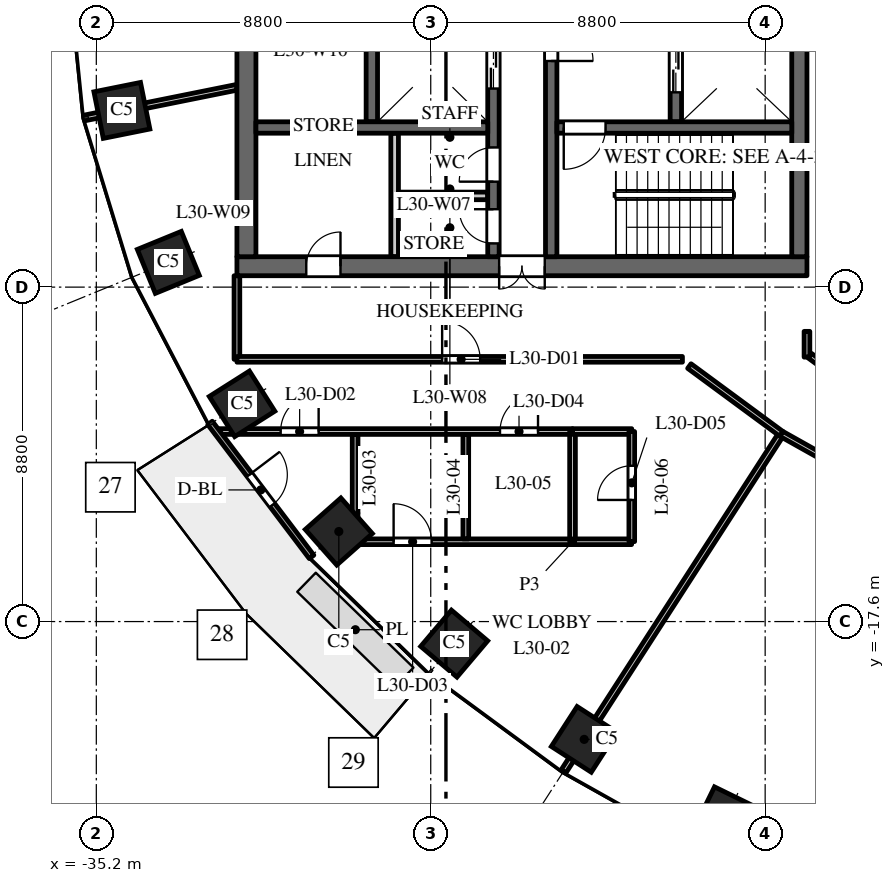
"""IFC4 building model, lengths in metres.
Left out: names, types, materials, properties, quantities, classifications, styles, units other than length and angle.
Written with IfcOpenShell. Run it as: python <this file> out.ifc"""

import sys

from ifc_helpers import new_model, si_unit, direction, frame, frame_2d, origin, origin_2d, place, context, subcontext, project, spatial, rectangle, extrude, element, fill, save


model = new_model("IFC4")
c1 = context("Model", 3, precision=1e-05, world=origin(), true_north=direction((0.0, 1.0)))
c2 = subcontext(c1, "Body", "Model", "MODEL_VIEW")
j1 = project(units=[si_unit("LENGTHUNIT", "METRE"), si_unit("PLANEANGLEUNIT", "RADIAN")], contexts=[c1])
p1 = place(None, origin())
s1 = spatial("IfcSite", under=j1, at=p1, CompositionType="ELEMENT")
p2 = place(p1, origin())
s2 = spatial("IfcBuilding", under=s1, at=p2, CompositionType="ELEMENT")
p3 = place(p2, frame((0.0, 0.0, 132.0)))
s3 = spatial("IfcBuildingStorey", under=s2, at=p3, CompositionType="ELEMENT", Elevation=132.0)
for number, where, z_axis, x_axis in (
    (1, (-34.527, -4.151, 0.0), (0.0, 0.0, 1.0), (0.197, -0.98, 0.0)),
    (2, (-33.305, -8.149, 0.0), (0.0, 0.0, 1.0), (0.379, -0.925, 0.0)),
    (3, (-31.365, -11.871, 0.0), (0.0, 0.0, 1.0), (0.535, -0.845, 0.0)),
    (4, (-28.819, -15.23, 0.0), (0.0, 0.0, 1.0), (0.663, -0.749, 0.0)),
    (5, (-25.783, -18.18, 0.0), (0.0, 0.0, 1.0), (0.763, -0.646, 0.0)),
    (6, (-22.362, -20.7, 0.0), (0.0, 0.0, 1.0), (0.84, -0.542, 0.0)),
    (7, (-18.646, -22.785, 0.0), (0.0, 0.0, 1.0), (0.898, -0.439, 0.0)),
):
    element("IfcColumn", number, at=place(p3, frame(where, z_axis=z_axis, x_axis=x_axis)), inside=s3, PredefinedType="COLUMN", context=c2, shape_type="SweptSolid", body=[
        extrude(rectangle(XDim=1.25, YDim=1.25, at=origin_2d()), origin(), (0.0, 0.0, 1.0), 4.0),
    ])
p4 = place(p3, frame((-16.5, -8.25, 0.0), z_axis=(0.0, 0.0, 1.0), x_axis=(-1.0, 0.0, 0.0)))
e8 = element("IfcWall", 8, at=p4, inside=s3, PredefinedType="SHEAR", context=c2, shape_type="SweptSolid", body=[
    extrude(rectangle(XDim=15.0, YDim=0.5, at=frame_2d((7.5, 0.0))), origin(), (0.0, 0.0, 1.0), 3.7),
])
p5 = place(p4, frame((6.9, 0.0, 0.0)))
e9 = element("IfcOpeningElement", 9, at=p5, cuts=e8, PredefinedType="OPENING", context=c2, shape_type="SweptSolid", body=[
    extrude(rectangle(XDim=1.2, YDim=2.1, at=frame_2d((0.6, 1.05))), frame((0.0, 0.26, 0.0), z_axis=(0.0, -1.0, 0.0), x_axis=(1.0, 0.0, 0.0)), (0.0, 0.0, 1.0), 0.52),
])
p6 = place(p4, frame((12.275, 0.0, 0.0)))
e10 = element("IfcOpeningElement", 10, at=p6, cuts=e8, PredefinedType="OPENING", context=c2, shape_type="SweptSolid", body=[
    extrude(rectangle(XDim=0.9, YDim=2.1, at=frame_2d((0.45, 1.05))), frame((0.0, 0.26, 0.0), z_axis=(0.0, -1.0, 0.0), x_axis=(1.0, 0.0, 0.0)), (0.0, 0.0, 1.0), 0.52),
])
p7 = place(p3, frame((-27.95, -4.45, 0.0), z_axis=(0.0, 0.0, 1.0), x_axis=(0.0, 1.0, 0.0)))
e11 = element("IfcWall", 11, at=p7, inside=s3, PredefinedType="SHEAR", context=c2, shape_type="SweptSolid", body=[
    extrude(rectangle(XDim=8.9, YDim=0.3, at=frame_2d((4.45, 0.0))), origin(), (0.0, 0.0, 1.0), 3.7),
])
p8 = place(p3, frame((-19.95, -4.45, 0.0), z_axis=(0.0, 0.0, 1.0), x_axis=(0.0, 1.0, 0.0)))
e12 = element("IfcWall", 12, at=p8, inside=s3, PredefinedType="SHEAR", context=c2, shape_type="SweptSolid", body=[
    extrude(rectangle(XDim=8.9, YDim=0.3, at=frame_2d((4.45, 0.0))), origin(), (0.0, 0.0, 1.0), 3.7),
])
p9 = place(p8, frame((0.775, 0.0, 0.0)))
e13 = element("IfcOpeningElement", 13, at=p9, cuts=e12, PredefinedType="OPENING", context=c2, shape_type="SweptSolid", body=[
    extrude(rectangle(XDim=1.2, YDim=2.1, at=frame_2d((0.6, 1.05))), frame((0.0, 0.16, 0.0), z_axis=(0.0, -1.0, 0.0), x_axis=(1.0, 0.0, 0.0)), (0.0, 0.0, 1.0), 0.32),
])
p10 = place(p8, frame((7.35, 0.0, 0.0)))
e14 = element("IfcOpeningElement", 14, at=p10, cuts=e12, PredefinedType="OPENING", context=c2, shape_type="SweptSolid", body=[
    extrude(rectangle(XDim=0.9, YDim=2.1, at=frame_2d((0.45, 1.05))), frame((0.0, 0.16, 0.0), z_axis=(0.0, -1.0, 0.0), x_axis=(1.0, 0.0, 0.0)), (0.0, 0.0, 1.0), 0.32),
])
p11 = place(p3, frame((-24.75, -8.0, 0.0), z_axis=(0.0, 0.0, 1.0), x_axis=(0.0, 1.0, 0.0)))
e15 = element("IfcWall", 15, at=p11, inside=s3, PredefinedType="SHEAR", context=c2, shape_type="SweptSolid", body=[
    extrude(rectangle(XDim=16.0, YDim=0.3, at=frame_2d((8.0, 0.0))), origin(), (0.0, 0.0, 1.0), 3.7),
])
p12 = place(p11, frame((4.425, 0.0, 0.0)))
e16 = element("IfcOpeningElement", 16, at=p12, cuts=e15, PredefinedType="OPENING", context=c2, shape_type="SweptSolid", body=[
    extrude(rectangle(XDim=1.1, YDim=2.1, at=frame_2d((0.55, 1.05))), frame((0.0, 0.16, 0.0), z_axis=(0.0, -1.0, 0.0), x_axis=(1.0, 0.0, 0.0)), (0.0, 0.0, 1.0), 0.32),
])
p13 = place(p11, frame((7.45, 0.0, 0.0)))
e17 = element("IfcOpeningElement", 17, at=p13, cuts=e15, PredefinedType="OPENING", context=c2, shape_type="SweptSolid", body=[
    extrude(rectangle(XDim=1.1, YDim=2.1, at=frame_2d((0.55, 1.05))), frame((0.0, 0.16, 0.0), z_axis=(0.0, -1.0, 0.0), x_axis=(1.0, 0.0, 0.0)), (0.0, 0.0, 1.0), 0.32),
])
p14 = place(p11, frame((10.425, 0.0, 0.0)))
e18 = element("IfcOpeningElement", 18, at=p14, cuts=e15, PredefinedType="OPENING", context=c2, shape_type="SweptSolid", body=[
    extrude(rectangle(XDim=1.2, YDim=2.1, at=frame_2d((0.6, 1.05))), frame((0.0, 0.16, 0.0), z_axis=(0.0, -1.0, 0.0), x_axis=(1.0, 0.0, 0.0)), (0.0, 0.0, 1.0), 0.32),
])
p15 = place(p11, frame((13.75, 0.0, 0.0)))
e19 = element("IfcOpeningElement", 19, at=p15, cuts=e15, PredefinedType="OPENING", context=c2, shape_type="SweptSolid", body=[
    extrude(rectangle(XDim=0.9, YDim=2.1, at=frame_2d((0.45, 1.05))), frame((0.0, 0.16, 0.0), z_axis=(0.0, -1.0, 0.0), x_axis=(1.0, 0.0, 0.0)), (0.0, 0.0, 1.0), 0.32),
])
p16 = place(p11, frame((1.975, 0.0, 0.0)))
e20 = element("IfcOpeningElement", 20, at=p16, cuts=e15, PredefinedType="OPENING", context=c2, shape_type="SweptSolid", body=[
    extrude(rectangle(XDim=0.9, YDim=2.1, at=frame_2d((0.45, 1.05))), frame((0.0, 0.16, 0.0), z_axis=(0.0, -1.0, 0.0), x_axis=(1.0, 0.0, 0.0)), (0.0, 0.0, 1.0), 0.32),
])
p17 = place(p11, frame((0.35, 0.0, 0.0)))
e21 = element("IfcOpeningElement", 21, at=p17, cuts=e15, PredefinedType="OPENING", context=c2, shape_type="SweptSolid", body=[
    extrude(rectangle(XDim=0.9, YDim=2.1, at=frame_2d((0.45, 1.05))), frame((0.0, 0.16, 0.0), z_axis=(0.0, -1.0, 0.0), x_axis=(1.0, 0.0, 0.0)), (0.0, 0.0, 1.0), 0.32),
])
p18 = place(p3, frame((-16.7, -8.0, 0.0), z_axis=(0.0, 0.0, 1.0), x_axis=(0.0, 1.0, 0.0)))
e22 = element("IfcWall", 22, at=p18, inside=s3, PredefinedType="SHEAR", context=c2, shape_type="SweptSolid", body=[
    extrude(rectangle(XDim=16.0, YDim=0.4, at=frame_2d((8.0, 0.0))), origin(), (0.0, 0.0, 1.0), 3.7),
])
p19 = place(p3, frame((-31.25, -8.0, 0.0), z_axis=(0.0, 0.0, 1.0), x_axis=(0.0, 1.0, 0.0)))
e23 = element("IfcWall", 23, at=p19, inside=s3, PredefinedType="SHEAR", context=c2, shape_type="SweptSolid", body=[
    extrude(rectangle(XDim=16.0, YDim=0.5, at=frame_2d((8.0, 0.0))), origin(), (0.0, 0.0, 1.0), 3.7),
])
p20 = place(p3, frame((-27.35, -8.0, 0.0), z_axis=(0.0, 0.0, 1.0), x_axis=(0.0, 1.0, 0.0)))
e24 = element("IfcWall", 24, at=p20, inside=s3, PredefinedType="PARTITIONING", context=c2, shape_type="SweptSolid", body=[
    extrude(rectangle(XDim=3.25, YDim=0.2, at=frame_2d((1.625, 0.0))), origin(), (0.0, 0.0, 1.0), 3.7),
])
p21 = place(p3, frame((-24.9, -6.4, 0.0), z_axis=(0.0, 0.0, 1.0), x_axis=(-1.0, 0.0, 0.0)))
e25 = element("IfcWall", 25, at=p21, inside=s3, PredefinedType="PARTITIONING", context=c2, shape_type="SweptSolid", body=[
    extrude(rectangle(XDim=2.35, YDim=0.2, at=frame_2d((1.175, 0.0))), origin(), (0.0, 0.0, 1.0), 3.7),
])
p22 = place(p3, frame((-24.9, -4.6, 0.0), z_axis=(0.0, 0.0, 1.0), x_axis=(-1.0, 0.0, 0.0)))
e26 = element("IfcWall", 26, at=p22, inside=s3, PredefinedType="SHEAR", context=c2, shape_type="SweptSolid", body=[
    extrude(rectangle(XDim=6.1, YDim=0.3, at=frame_2d((3.05, 0.0))), origin(), (0.0, 0.0, 1.0), 3.7),
])
p23 = place(p3, frame((-23.23, -8.0, 0.0), z_axis=(0.0, 0.0, 1.0), x_axis=(0.0, 1.0, 0.0)))
e27 = element("IfcWall", 27, at=p23, inside=s3, PredefinedType="SHEAR", context=c2, shape_type="SweptSolid", body=[
    extrude(rectangle(XDim=7.875, YDim=0.3, at=frame_2d((3.938, 0.0))), origin(), (0.0, 0.0, 1.0), 3.7),
])
p24 = place(p23, frame((5.15, 0.0, 0.0)))
e28 = element("IfcOpeningElement", 28, at=p24, cuts=e27, PredefinedType="OPENING", context=c2, shape_type="SweptSolid", body=[
    extrude(rectangle(XDim=1.1, YDim=2.1, at=frame_2d((0.55, 1.05))), frame((0.0, 0.16, 0.0), z_axis=(0.0, -1.0, 0.0), x_axis=(1.0, 0.0, 0.0)), (0.0, 0.0, 1.0), 0.32),
])
p25 = place(p3, frame((-16.9, -4.6, 0.0), z_axis=(0.0, 0.0, 1.0), x_axis=(-1.0, 0.0, 0.0)))
e29 = element("IfcWall", 29, at=p25, inside=s3, PredefinedType="SHEAR", context=c2, shape_type="SweptSolid", body=[
    extrude(rectangle(XDim=6.18, YDim=0.3, at=frame_2d((3.09, 0.0))), origin(), (0.0, 0.0, 1.0), 3.7),
])
p26 = place(p25, frame((4.9, 0.0, 0.0)))
e30 = element("IfcOpeningElement", 30, at=p26, cuts=e29, PredefinedType="OPENING", context=c2, shape_type="SweptSolid", body=[
    extrude(rectangle(XDim=1.1, YDim=2.1, at=frame_2d((0.55, 1.05))), frame((0.0, 0.16, 0.0), z_axis=(0.0, -1.0, 0.0), x_axis=(1.0, 0.0, 0.0)), (0.0, 0.0, 1.0), 0.32),
])
p27 = place(p3, frame((-32.208, -12.374, 0.0), z_axis=(0.0, 0.0, 1.0), x_axis=(0.604045763106, -0.796949632081, 0.0)))
e31 = element("IfcWall", 31, at=p27, inside=s3, PredefinedType="STANDARD", context=c2, shape_type="SweptSolid", body=[
    extrude(rectangle(XDim=4.423, YDim=0.15, at=frame_2d((2.212, 0.0))), origin(), (0.0, 0.0, 1.0), 3.7),
])
p28 = place(p27, frame((1.712, 0.0, 0.0)))
e32 = element("IfcOpeningElement", 32, at=p28, cuts=e31, PredefinedType="OPENING", context=c2, shape_type="SweptSolid", body=[
    extrude(rectangle(XDim=1.0, YDim=2.4, at=frame_2d((0.5, 1.2))), frame((0.0, 0.085, 0.0), z_axis=(0.0, -1.0, 0.0), x_axis=(1.0, 0.0, 0.0)), (0.0, 0.0, 1.0), 0.17),
])
p29 = place(p3, frame((-35.512, -4.349, 0.0), z_axis=(0.0, 0.0, 1.0), x_axis=(0.980357474535, 0.197228857227, 0.0)))
e33 = element("IfcWall", 33, at=p29, inside=s3, PredefinedType="PARTITIONING", context=c2, shape_type="SweptSolid", body=[
    extrude(rectangle(XDim=4.092, YDim=0.15, at=frame_2d((2.046, 0.0))), origin(), (0.0, 0.0, 1.0), 3.2),
])
p30 = place(p3, frame((-32.063, -12.6, 0.0), z_axis=(0.0, 0.0, 1.0), x_axis=(1.0, 0.0, 0.0)))
e34 = element("IfcWall", 34, at=p30, inside=s3, PredefinedType="PARTITIONING", context=c2, shape_type="SweptSolid", body=[
    extrude(rectangle(XDim=9.394, YDim=0.15, at=frame_2d((4.697, 0.0))), origin(), (0.0, 0.0, 1.0), 2.9),
])
p31 = place(p30, frame((1.713, 0.0, 0.0)))
e35 = element("IfcOpeningElement", 35, at=p31, cuts=e34, PredefinedType="OPENING", context=c2, shape_type="SweptSolid", body=[
    extrude(rectangle(XDim=1.0, YDim=2.1, at=frame_2d((0.5, 1.05))), frame((0.0, 0.085, 0.0), z_axis=(0.0, -1.0, 0.0), x_axis=(1.0, 0.0, 0.0)), (0.0, 0.0, 1.0), 0.17),
])
p32 = place(p30, frame((7.486, 0.0, 0.0)))
e36 = element("IfcOpeningElement", 36, at=p32, cuts=e34, PredefinedType="OPENING", context=c2, shape_type="SweptSolid", body=[
    extrude(rectangle(XDim=1.0, YDim=2.1, at=frame_2d((0.5, 1.05))), frame((0.0, 0.085, 0.0), z_axis=(0.0, -1.0, 0.0), x_axis=(1.0, 0.0, 0.0)), (0.0, 0.0, 1.0), 0.17),
])
p33 = place(p3, frame((-31.5, -10.7, 0.0), z_axis=(0.0, 0.0, 1.0), x_axis=(0.0, 1.0, 0.0)))
e37 = element("IfcWall", 37, at=p33, inside=s3, PredefinedType="PARTITIONING", context=c2, shape_type="SweptSolid", body=[
    extrude(rectangle(XDim=2.2, YDim=0.15, at=frame_2d((1.1, 0.0))), origin(), (0.0, 0.0, 1.0), 3.7),
])
p34 = place(p3, frame((-31.5, -10.7, 0.0), z_axis=(0.0, 0.0, 1.0), x_axis=(1.0, 0.0, 0.0)))
e38 = element("IfcWall", 38, at=p34, inside=s3, PredefinedType="PARTITIONING", context=c2, shape_type="SweptSolid", body=[
    extrude(rectangle(XDim=11.723, YDim=0.15, at=frame_2d((5.861, 0.0))), origin(), (0.0, 0.0, 1.0), 3.1),
])
p35 = place(p34, frame((5.4, 0.0, 0.0)))
e39 = element("IfcOpeningElement", 39, at=p35, cuts=e38, PredefinedType="OPENING", context=c2, shape_type="SweptSolid", body=[
    extrude(rectangle(XDim=1.0, YDim=2.1, at=frame_2d((0.5, 1.05))), frame((0.0, 0.085, 0.0), z_axis=(0.0, -1.0, 0.0), x_axis=(1.0, 0.0, 0.0)), (0.0, 0.0, 1.0), 0.17),
])
p36 = place(p3, frame((-28.933, -15.5, 0.0), z_axis=(0.0, 0.0, 1.0), x_axis=(1.0, 0.0, 0.0)))
e40 = element("IfcWall", 40, at=p36, inside=s3, PredefinedType="PARTITIONING", context=c2, shape_type="SweptSolid", body=[
    extrude(rectangle(XDim=6.264, YDim=0.15, at=frame_2d((3.132, 0.0))), origin(), (0.0, 0.0, 1.0), 2.9),
])
p37 = place(p36, frame((1.556, 0.0, 0.0)))
e41 = element("IfcOpeningElement", 41, at=p37, cuts=e40, PredefinedType="OPENING", context=c2, shape_type="SweptSolid", body=[
    extrude(rectangle(XDim=1.0, YDim=2.1, at=frame_2d((0.5, 1.05))), frame((0.0, 0.085, 0.0), z_axis=(0.0, -1.0, 0.0), x_axis=(1.0, 0.0, 0.0)), (0.0, 0.0, 1.0), 0.17),
])
p38 = place(p3, frame((-28.39, -15.425, 0.0), z_axis=(0.0, 0.0, 1.0), x_axis=(0.0, 1.0, 0.0)))
e42 = element("IfcWall", 42, at=p38, inside=s3, PredefinedType="PARTITIONING", context=c2, shape_type="SweptSolid", body=[
    extrude(rectangle(XDim=2.75, YDim=0.15, at=frame_2d((1.375, 0.0))), origin(), (0.0, 0.0, 1.0), 2.9),
])
p39 = place(p3, frame((-25.477, -15.425, 0.0), z_axis=(0.0, 0.0, 1.0), x_axis=(0.0, 1.0, 0.0)))
e43 = element("IfcWall", 43, at=p39, inside=s3, PredefinedType="PARTITIONING", context=c2, shape_type="SweptSolid", body=[
    extrude(rectangle(XDim=2.75, YDim=0.15, at=frame_2d((1.375, 0.0))), origin(), (0.0, 0.0, 1.0), 3.7),
])
p40 = place(p3, frame((-22.905, -21.542, 0.0), z_axis=(0.0, 0.0, 1.0), x_axis=(0.542214233103, 0.840240278385, 0.0)))
e44 = element("IfcWall", 44, at=p40, inside=s3, PredefinedType="PARTITIONING", context=c2, shape_type="SweptSolid", body=[
    extrude(rectangle(XDim=10.566, YDim=0.15, at=frame_2d((5.283, 0.0))), origin(), (0.0, 0.0, 1.0), 2.9),
])
p41 = place(p3, frame((-22.669, -15.5, 0.0), z_axis=(0.0, 0.0, 1.0), x_axis=(0.0, 1.0, 0.0)))
e45 = element("IfcWall", 45, at=p41, inside=s3, PredefinedType="PARTITIONING", context=c2, shape_type="SweptSolid", body=[
    extrude(rectangle(XDim=2.9, YDim=0.15, at=frame_2d((1.45, 0.0))), origin(), (0.0, 0.0, 1.0), 3.7),
])
p42 = place(p3, frame((-22.669, -15.5, 0.0), z_axis=(0.0, 0.0, 1.0), x_axis=(1.0, 0.0, 0.0)))
e46 = element("IfcWall", 46, at=p42, inside=s3, PredefinedType="PARTITIONING", context=c2, shape_type="SweptSolid", body=[
    extrude(rectangle(XDim=1.555, YDim=0.15, at=frame_2d((0.777, 0.0))), origin(), (0.0, 0.0, 1.0), 2.75),
])
p43 = place(p3, frame((-22.669, -12.6, 0.0), z_axis=(0.0, 0.0, 1.0), x_axis=(1.0, 0.0, 0.0)))
e47 = element("IfcWall", 47, at=p43, inside=s3, PredefinedType="PARTITIONING", context=c2, shape_type="SweptSolid", body=[
    extrude(rectangle(XDim=1.559, YDim=0.15, at=frame_2d((0.779, 0.0))), origin(), (0.0, 0.0, 1.0), 3.7),
])
p44 = place(p3, frame((-21.11, -15.496, 0.0), z_axis=(0.0, 0.0, 1.0), x_axis=(0.0, 1.0, 0.0)))
e48 = element("IfcWall", 48, at=p44, inside=s3, PredefinedType="PARTITIONING", context=c2, shape_type="SweptSolid", body=[
    extrude(rectangle(XDim=2.896, YDim=0.15, at=frame_2d((1.448, 0.0))), origin(), (0.0, 0.0, 1.0), 2.75),
])
p45 = place(p44, frame((1.096, 0.0, 0.0)))
e49 = element("IfcOpeningElement", 49, at=p45, cuts=e48, PredefinedType="OPENING", context=c2, shape_type="SweptSolid", body=[
    extrude(rectangle(XDim=0.9, YDim=2.1, at=frame_2d((0.45, 1.05))), frame((0.0, 0.085, 0.0), z_axis=(0.0, -1.0, 0.0), x_axis=(1.0, 0.0, 0.0)), (0.0, 0.0, 1.0), 0.17),
])
p46 = place(p3, frame((-19.595, -10.877, 0.0), z_axis=(0.0, 0.0, 1.0), x_axis=(0.805151708762, -0.593068904831, 0.0)))
e50 = element("IfcWall", 50, at=p46, inside=s3, PredefinedType="PARTITIONING", context=c2, shape_type="SweptSolid", body=[
    extrude(rectangle(XDim=3.008, YDim=0.15, at=frame_2d((1.504, 0.0))), origin(), (0.0, 0.0, 1.0), 2.75),
])
p47 = place(p3, frame((-17.173, -12.661, 0.0), z_axis=(0.0, 0.0, 1.0), x_axis=(0.872054495499, -0.489408783003, 0.0)))
e51 = element("IfcWall", 51, at=p47, inside=s3, PredefinedType="PARTITIONING", context=c2, shape_type="SweptSolid", body=[
    extrude(rectangle(XDim=3.128, YDim=0.15, at=frame_2d((1.564, 0.0))), origin(), (0.0, 0.0, 1.0), 3.7),
])
p48 = place(p3, frame((-16.5, -10.642, 0.0), z_axis=(0.0, 0.0, 1.0), x_axis=(0.0, 1.0, 0.0)))
e52 = element("IfcWall", 52, at=p48, inside=s3, PredefinedType="PARTITIONING", context=c2, shape_type="SweptSolid", body=[
    extrude(rectangle(XDim=0.678, YDim=0.15, at=frame_2d((0.339, 0.0))), origin(), (0.0, 0.0, 1.0), 3.7),
])
p49 = place(p3, frame((-16.425, -10.604, 0.0), z_axis=(0.0, 0.0, 1.0), x_axis=(0.805608867586, -0.592447763492, 0.0)))
e53 = element("IfcWall", 53, at=p49, inside=s3, PredefinedType="PARTITIONING", context=c2, shape_type="SweptSolid", body=[
    extrude(rectangle(XDim=0.488, YDim=0.15, at=frame_2d((0.244, 0.0))), origin(), (0.0, 0.0, 1.0), 3.7),
])
p50 = place(p9, origin())
e54 = element("IfcDoor", 54, at=p50, inside=s3, OperationType="DOUBLE_DOOR_SLIDING", PredefinedType="DOOR", context=c2, shape_type="SweptSolid", body=[
    extrude(rectangle(XDim=1.2, YDim=2.1, at=frame_2d((0.6, 1.05))), frame((0.0, 0.025, 0.0), z_axis=(0.0, -1.0, 0.0), x_axis=(1.0, 0.0, 0.0)), (0.0, 0.0, 1.0), 0.05),
])
fill(e13, e54)
p51 = place(p12, origin())
e55 = element("IfcDoor", 55, at=p51, inside=s3, OperationType="DOUBLE_DOOR_SLIDING", PredefinedType="DOOR", context=c2, shape_type="SweptSolid", body=[
    extrude(rectangle(XDim=1.1, YDim=2.1, at=frame_2d((0.55, 1.05))), frame((0.0, 0.025, 0.0), z_axis=(0.0, -1.0, 0.0), x_axis=(1.0, 0.0, 0.0)), (0.0, 0.0, 1.0), 0.05),
])
fill(e16, e55)
p52 = place(p26, origin())
e56 = element("IfcDoor", 56, at=p52, inside=s3, OperationType="SINGLE_SWING_LEFT", PredefinedType="DOOR", context=c2, shape_type="SweptSolid", body=[
    extrude(rectangle(XDim=1.1, YDim=2.1, at=frame_2d((0.55, 1.05))), frame((0.0, 0.025, 0.0), z_axis=(0.0, -1.0, 0.0), x_axis=(1.0, 0.0, 0.0)), (0.0, 0.0, 1.0), 0.05),
])
fill(e30, e56)
p53 = place(p24, origin())
e57 = element("IfcDoor", 57, at=p53, inside=s3, OperationType="SINGLE_SWING_LEFT", PredefinedType="DOOR", context=c2, shape_type="SweptSolid", body=[
    extrude(rectangle(XDim=1.1, YDim=2.1, at=frame_2d((0.55, 1.05))), frame((0.0, 0.025, 0.0), z_axis=(0.0, -1.0, 0.0), x_axis=(1.0, 0.0, 0.0)), (0.0, 0.0, 1.0), 0.05),
])
fill(e28, e57)
p54 = place(p5, origin())
e58 = element("IfcDoor", 58, at=p54, inside=s3, OperationType="DOUBLE_DOOR_DOUBLE_SWING", PredefinedType="DOOR", context=c2, shape_type="SweptSolid", body=[
    extrude(rectangle(XDim=1.2, YDim=2.1, at=frame_2d((0.6, 1.05))), frame((0.0, 0.025, 0.0), z_axis=(0.0, -1.0, 0.0), x_axis=(1.0, 0.0, 0.0)), (0.0, 0.0, 1.0), 0.05),
])
fill(e9, e58)
p55 = place(p16, origin())
e59 = element("IfcDoor", 59, at=p55, inside=s3, OperationType="SINGLE_SWING_RIGHT", PredefinedType="DOOR", context=c2, shape_type="SweptSolid", body=[
    extrude(rectangle(XDim=0.9, YDim=2.1, at=frame_2d((0.45, 1.05))), frame((0.0, 0.025, 0.0), z_axis=(0.0, -1.0, 0.0), x_axis=(1.0, 0.0, 0.0)), (0.0, 0.0, 1.0), 0.05),
])
fill(e20, e59)
p56 = place(p17, origin())
e60 = element("IfcDoor", 60, at=p56, inside=s3, OperationType="SINGLE_SWING_LEFT", PredefinedType="DOOR", context=c2, shape_type="SweptSolid", body=[
    extrude(rectangle(XDim=0.9, YDim=2.1, at=frame_2d((0.45, 1.05))), frame((0.0, 0.025, 0.0), z_axis=(0.0, -1.0, 0.0), x_axis=(1.0, 0.0, 0.0)), (0.0, 0.0, 1.0), 0.05),
])
fill(e21, e60)
p57 = place(p6, origin())
e61 = element("IfcDoor", 61, at=p57, inside=s3, OperationType="SINGLE_SWING_LEFT", PredefinedType="DOOR", context=c2, shape_type="SweptSolid", body=[
    extrude(rectangle(XDim=0.9, YDim=2.1, at=frame_2d((0.45, 1.05))), frame((0.0, 0.025, 0.0), z_axis=(0.0, -1.0, 0.0), x_axis=(1.0, 0.0, 0.0)), (0.0, 0.0, 1.0), 0.05),
])
fill(e10, e61)
p58 = place(p28, origin())
e62 = element("IfcDoor", 62, at=p58, inside=s3, OperationType="SINGLE_SWING_LEFT", PredefinedType="DOOR", context=c2, shape_type="SweptSolid", body=[
    extrude(rectangle(XDim=1.0, YDim=2.4, at=frame_2d((0.5, 1.2))), frame((0.0, 0.025, 0.0), z_axis=(0.0, -1.0, 0.0), x_axis=(1.0, 0.0, 0.0)), (0.0, 0.0, 1.0), 0.05),
])
fill(e32, e62)
p59 = place(p35, origin())
e63 = element("IfcDoor", 63, at=p59, inside=s3, OperationType="SINGLE_SWING_LEFT", PredefinedType="DOOR", context=c2, shape_type="SweptSolid", body=[
    extrude(rectangle(XDim=1.0, YDim=2.1, at=frame_2d((0.5, 1.05))), frame((0.0, 0.025, 0.0), z_axis=(0.0, -1.0, 0.0), x_axis=(1.0, 0.0, 0.0)), (0.0, 0.0, 1.0), 0.05),
])
fill(e39, e63)
p60 = place(p31, origin())
e64 = element("IfcDoor", 64, at=p60, inside=s3, OperationType="SINGLE_SWING_RIGHT", PredefinedType="DOOR", context=c2, shape_type="SweptSolid", body=[
    extrude(rectangle(XDim=1.0, YDim=2.1, at=frame_2d((0.5, 1.05))), frame((0.0, 0.025, 0.0), z_axis=(0.0, -1.0, 0.0), x_axis=(1.0, 0.0, 0.0)), (0.0, 0.0, 1.0), 0.05),
])
fill(e35, e64)
p61 = place(p37, origin())
e65 = element("IfcDoor", 65, at=p61, inside=s3, OperationType="SINGLE_SWING_LEFT", PredefinedType="DOOR", context=c2, shape_type="SweptSolid", body=[
    extrude(rectangle(XDim=1.0, YDim=2.1, at=frame_2d((0.5, 1.05))), frame((0.0, 0.025, 0.0), z_axis=(0.0, -1.0, 0.0), x_axis=(1.0, 0.0, 0.0)), (0.0, 0.0, 1.0), 0.05),
])
fill(e41, e65)
p62 = place(p32, origin())
e66 = element("IfcDoor", 66, at=p62, inside=s3, OperationType="SINGLE_SWING_RIGHT", PredefinedType="DOOR", context=c2, shape_type="SweptSolid", body=[
    extrude(rectangle(XDim=1.0, YDim=2.1, at=frame_2d((0.5, 1.05))), frame((0.0, 0.025, 0.0), z_axis=(0.0, -1.0, 0.0), x_axis=(1.0, 0.0, 0.0)), (0.0, 0.0, 1.0), 0.05),
])
fill(e36, e66)
p63 = place(p45, origin())
e67 = element("IfcDoor", 67, at=p63, inside=s3, OperationType="SINGLE_SWING_LEFT", PredefinedType="DOOR", context=c2, shape_type="SweptSolid", body=[
    extrude(rectangle(XDim=0.9, YDim=2.1, at=frame_2d((0.45, 1.05))), frame((0.0, 0.025, 0.0), z_axis=(0.0, -1.0, 0.0), x_axis=(1.0, 0.0, 0.0)), (0.0, 0.0, 1.0), 0.05),
])
fill(e49, e67)
save(model, sys.argv[1])
